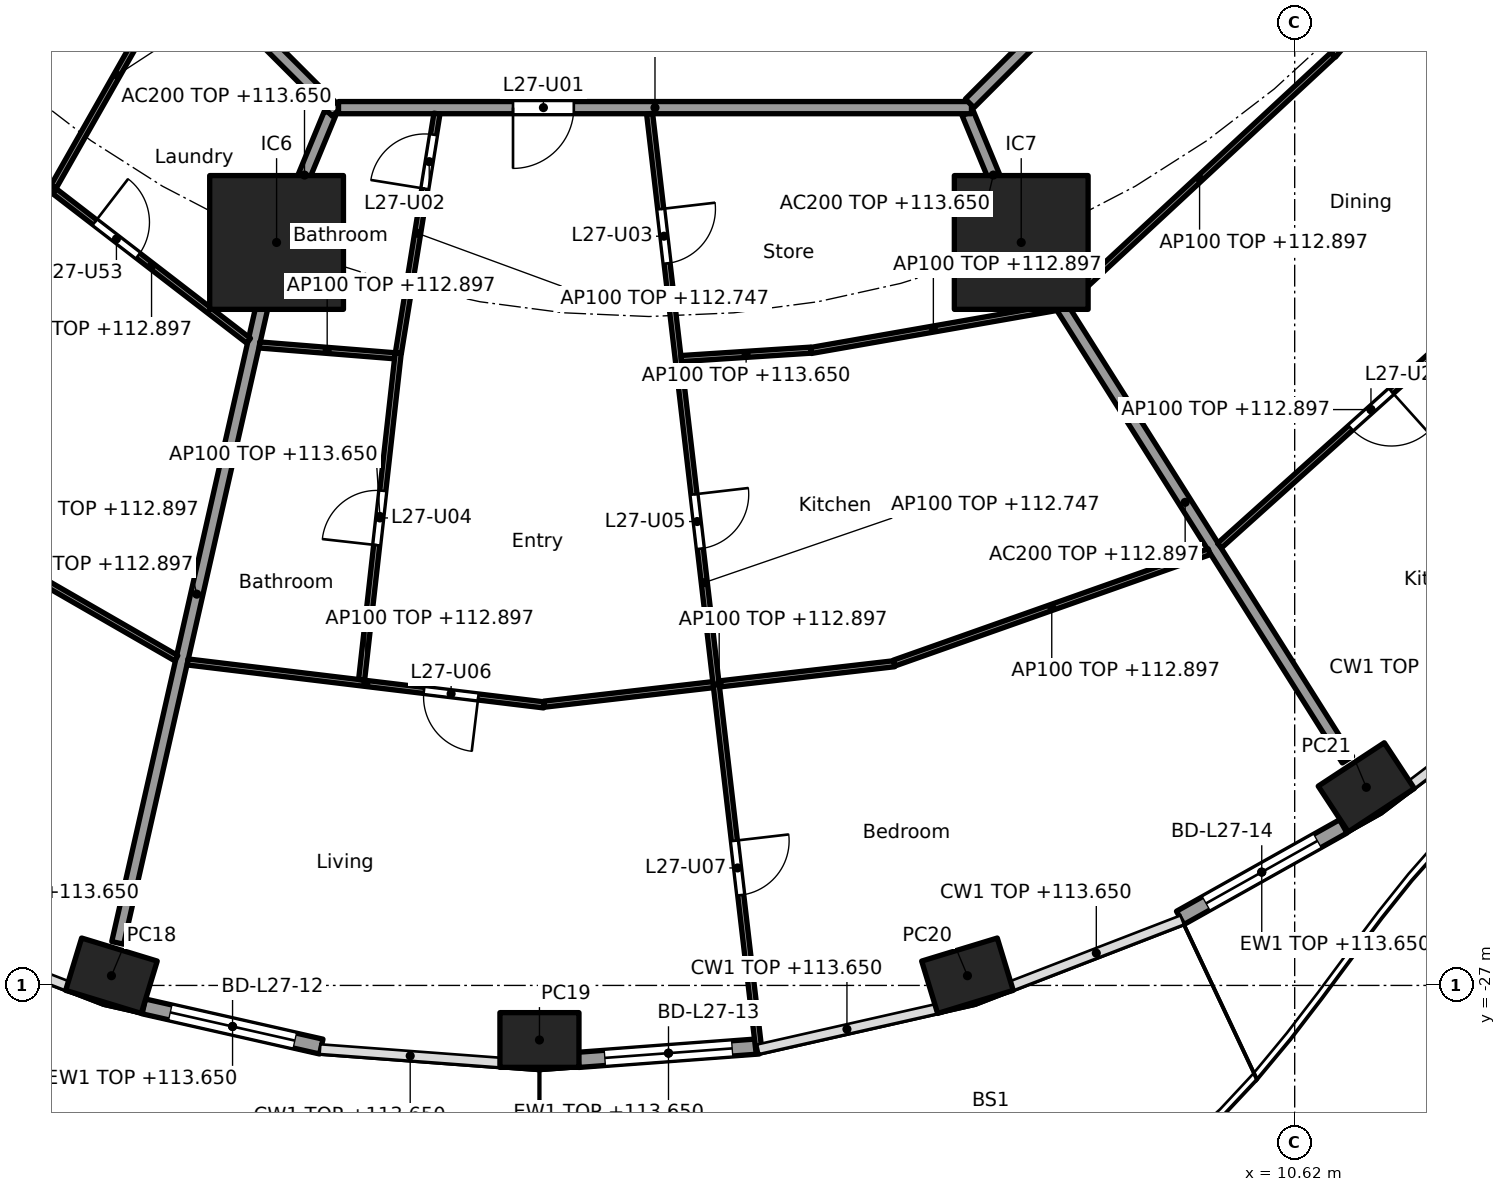
"""IFC4 building model, lengths in metres.
Left out: names, types, materials, properties, quantities, classifications, styles, units other than length and angle.
Written with IfcOpenShell. Run it as: python <this file> out.ifc"""

import sys

from ifc_helpers import new_model, si_unit, direction, frame, frame_2d, origin, origin_2d, place, context, subcontext, project, spatial, rectangle, hollow_rectangle, extrude, element, fill, save


model = new_model("IFC4")
c1 = context("Model", 3, precision=1e-05, world=origin(), true_north=direction((0.0, 1.0)))
c2 = subcontext(c1, "Body", "Model", "MODEL_VIEW")
j1 = project(units=[si_unit("LENGTHUNIT", "METRE"), si_unit("PLANEANGLEUNIT", "RADIAN")], contexts=[c1])
p1 = place(None, origin())
s1 = spatial("IfcSite", under=j1, at=p1, CompositionType="ELEMENT")
p2 = place(p1, origin())
s2 = spatial("IfcBuilding", under=s1, at=p2, CompositionType="ELEMENT")
p3 = place(p2, frame((0.0, 0.0, 110.3)))
s3 = spatial("IfcBuildingStorey", under=s2, at=p3, CompositionType="ELEMENT", Elevation=110.3)
for number, where, z_axis, x_axis in (
    (1, (-8.839, -26.841, 0.0), (0.0, 0.0, 1.0), (0.957, -0.292, 0.0)),
    (2, (-1.8, -27.897, 0.0), (0.0, 0.0, 1.0), (1.0, 0.0, 0.0)),
    (3, (5.239, -26.841, 0.0), (0.0, 0.0, 1.0), (0.957, 0.292, 0.0)),
    (4, (11.798, -23.742, 0.0), (0.0, 0.0, 1.0), (0.836, 0.549, 0.0)),
):
    element("IfcColumn", number, at=place(p3, frame(where, z_axis=z_axis, x_axis=x_axis)), inside=s3, PredefinedType="COLUMN", context=c2, shape_type="SweptSolid", body=[
        extrude(hollow_rectangle(XDim=1.3, YDim=0.9, WallThickness=0.045, at=origin_2d()), origin(), (0.0, 0.0, 1.0), 3.7),
    ])
for number, where, z_axis, x_axis in (
    (5, (-6.123, -14.782, 0.0), (0.0, 0.0, 1.0), (1.0, 0.0, 0.0)),
    (6, (6.123, -14.782, 0.0), (0.0, 0.0, 1.0), (1.0, 0.0, 0.0)),
):
    element("IfcColumn", number, at=place(p3, frame(where, z_axis=z_axis, x_axis=x_axis)), inside=s3, PredefinedType="COLUMN", context=c2, shape_type="SweptSolid", body=[
        extrude(rectangle(XDim=2.2, YDim=2.2, at=origin_2d()), origin(), (0.0, 0.0, 1.0), 3.7),
    ])
p4 = place(p3, frame((-5.387, -28.006, 0.0), z_axis=(0.0, 0.0, 1.0), x_axis=(-0.975317607872, 0.220806620767, 0.0)))
e7 = element("IfcWall", 7, at=p4, inside=s3, PredefinedType="SOLIDWALL", context=c2, shape_type="SweptSolid", body=[
    extrude(rectangle(XDim=2.993, YDim=0.25, at=frame_2d((1.497, 0.0))), origin(), (0.0, 0.0, 1.0), 3.35),
])
p5 = place(p4, frame((0.447, 0.0, 0.0)))
e8 = element("IfcOpeningElement", 8, at=p5, cuts=e7, PredefinedType="OPENING", context=c2, shape_type="SweptSolid", body=[
    extrude(rectangle(XDim=2.1, YDim=2.4, at=frame_2d((1.05, 1.2))), frame((0.0, 0.135, 0.0), z_axis=(0.0, -1.0, 0.0), x_axis=(1.0, 0.0, 0.0)), (0.0, 0.0, 1.0), 0.27),
])
p6 = place(p3, frame((1.806, -28.003, 0.0), z_axis=(0.0, 0.0, 1.0), x_axis=(-0.997226174467, -0.074430887117, 0.0)))
e9 = element("IfcWall", 9, at=p6, inside=s3, PredefinedType="SOLIDWALL", context=c2, shape_type="SweptSolid", body=[
    extrude(rectangle(XDim=2.975, YDim=0.25, at=frame_2d((1.488, 0.0))), origin(), (0.0, 0.0, 1.0), 3.35),
])
p7 = place(p6, frame((0.438, 0.0, 0.0)))
e10 = element("IfcOpeningElement", 10, at=p7, cuts=e9, PredefinedType="OPENING", context=c2, shape_type="SweptSolid", body=[
    extrude(rectangle(XDim=2.1, YDim=2.4, at=frame_2d((1.05, 1.2))), frame((0.0, 0.135, 0.0), z_axis=(0.0, -1.0, 0.0), x_axis=(1.0, 0.0, 0.0)), (0.0, 0.0, 1.0), 0.27),
])
p8 = place(p3, frame((11.419, -24.384, 0.0), z_axis=(0.0, 0.0, 1.0), x_axis=(-0.872071158476, -0.489379090843, 0.0)))
e11 = element("IfcWall", 11, at=p8, inside=s3, PredefinedType="SOLIDWALL", context=c2, shape_type="SweptSolid", body=[
    extrude(rectangle(XDim=3.076, YDim=0.25, at=frame_2d((1.538, 0.0))), origin(), (0.0, 0.0, 1.0), 3.35),
])
p9 = place(p8, frame((0.488, 0.0, 0.0)))
e12 = element("IfcOpeningElement", 12, at=p9, cuts=e11, PredefinedType="OPENING", context=c2, shape_type="SweptSolid", body=[
    extrude(rectangle(XDim=2.1, YDim=2.4, at=frame_2d((1.05, 1.2))), frame((0.0, 0.135, 0.0), z_axis=(0.0, -1.0, 0.0), x_axis=(1.0, 0.0, 0.0)), (0.0, 0.0, 1.0), 0.27),
])
p10 = place(p3, frame((-5.243, -12.657, 0.0), z_axis=(0.0, 0.0, 1.0), x_axis=(-0.382668627144, -0.923885664896, 0.0)))
e13 = element("IfcWall", 13, at=p10, inside=s3, PredefinedType="PARTITIONING", context=c2, shape_type="SweptSolid", body=[
    extrude(rectangle(XDim=2.2, YDim=0.2, at=frame_2d((1.1, 0.0))), origin(), (0.0, 0.0, 1.0), 3.35),
])
p11 = place(p3, frame((-6.134, -14.831, 0.0), z_axis=(0.0, 0.0, 1.0), x_axis=(-0.221225405869, -0.975222702667, 0.0)))
e14 = element("IfcWall", 14, at=p11, inside=s3, PredefinedType="PARTITIONING", context=c2, shape_type="SweptSolid", body=[
    extrude(rectangle(XDim=11.761, YDim=0.2, at=frame_2d((5.88, 0.0))), origin(), (0.0, 0.0, 1.0), 2.597),
])
p12 = place(p3, frame((5.243, -12.657, 0.0), z_axis=(0.0, 0.0, 1.0), x_axis=(0.382747093259, -0.923853160736, 0.0)))
e15 = element("IfcWall", 15, at=p12, inside=s3, PredefinedType="PARTITIONING", context=c2, shape_type="SweptSolid", body=[
    extrude(rectangle(XDim=2.2, YDim=0.2, at=frame_2d((1.1, 0.0))), origin(), (0.0, 0.0, 1.0), 3.35),
])
p13 = place(p3, frame((6.15, -14.824, 0.0), z_axis=(0.0, 0.0, 1.0), x_axis=(0.533492589682, -0.845804739142, 0.0)))
e16 = element("IfcWall", 16, at=p13, inside=s3, PredefinedType="PARTITIONING", context=c2, shape_type="SweptSolid", body=[
    extrude(rectangle(XDim=10.006, YDim=0.2, at=frame_2d((5.003, 0.0))), origin(), (0.0, 0.0, 1.0), 2.597),
])
p14 = place(p3, frame((-12.635, -5.134, 0.0), z_axis=(0.0, 0.0, 1.0), x_axis=(0.707106781187, -0.707106781187, 0.0)))
e17 = element("IfcWall", 17, at=p14, inside=s3, PredefinedType="PARTITIONING", context=c2, shape_type="SweptSolid", body=[
    extrude(rectangle(XDim=10.609, YDim=0.2, at=frame_2d((5.305, 0.0))), origin(), (0.0, 0.0, 1.0), 3.35),
])
p15 = place(p3, frame((-5.104, -12.565, 0.0), z_axis=(0.0, 0.0, 1.0), x_axis=(1.0, 0.0, 0.0)))
e18 = element("IfcWall", 18, at=p15, inside=s3, PredefinedType="PARTITIONING", context=c2, shape_type="SweptSolid", body=[
    extrude(rectangle(XDim=10.409, YDim=0.2, at=frame_2d((5.205, 0.0))), origin(), (0.0, 0.0, 1.0), 3.35),
])
p16 = place(p15, frame((2.87, 0.0, 0.0)))
e19 = element("IfcOpeningElement", 19, at=p16, cuts=e18, PredefinedType="OPENING", context=c2, shape_type="SweptSolid", body=[
    extrude(rectangle(XDim=1.0, YDim=2.1, at=frame_2d((0.5, 1.05))), frame((0.0, 0.11, 0.0), z_axis=(0.0, -1.0, 0.0), x_axis=(1.0, 0.0, 0.0)), (0.0, 0.0, 1.0), 0.22),
])
p17 = place(p3, frame((5.275, -12.494, 0.0), z_axis=(0.0, 0.0, 1.0), x_axis=(0.707106781187, 0.707106781187, 0.0)))
e20 = element("IfcWall", 20, at=p17, inside=s3, PredefinedType="PARTITIONING", context=c2, shape_type="SweptSolid", body=[
    extrude(rectangle(XDim=10.409, YDim=0.2, at=frame_2d((5.205, 0.0))), origin(), (0.0, 0.0, 1.0), 3.35),
])
p18 = place(p3, frame((-13.118, -10.8, 0.0), z_axis=(0.0, 0.0, 1.0), x_axis=(0.72818280142, -0.685382964273, 0.0)))
e21 = element("IfcWall", 21, at=p18, inside=s3, PredefinedType="PARTITIONING", context=c2, shape_type="SweptSolid", body=[
    extrude(rectangle(XDim=4.586, YDim=0.1, at=frame_2d((2.293, 0.0))), origin(), (0.0, 0.0, 1.0), 2.597),
])
p19 = place(p3, frame((-7.707, -10.198, 0.0), z_axis=(0.0, 0.0, 1.0), x_axis=(-0.493986531217, -0.869469554945, 0.0)))
e22 = element("IfcWall", 22, at=p19, inside=s3, PredefinedType="PARTITIONING", context=c2, shape_type="SweptSolid", body=[
    extrude(rectangle(XDim=4.217, YDim=0.1, at=frame_2d((2.109, 0.0))), origin(), (0.0, 0.0, 1.0), 2.447),
])
p20 = place(p3, frame((-9.775, -13.939, 0.0), z_axis=(0.0, 0.0, 1.0), x_axis=(0.792162117554, -0.610310723741, 0.0)))
e23 = element("IfcWall", 23, at=p20, inside=s3, PredefinedType="PARTITIONING", context=c2, shape_type="SweptSolid", body=[
    extrude(rectangle(XDim=4.03, YDim=0.1, at=frame_2d((2.015, 0.0))), origin(), (0.0, 0.0, 1.0), 2.597),
])
p21 = place(p20, frame((0.836, 0.0, 0.0)))
e24 = element("IfcOpeningElement", 24, at=p21, cuts=e23, PredefinedType="OPENING", context=c2, shape_type="SweptSolid", body=[
    extrude(rectangle(XDim=0.9, YDim=2.1, at=frame_2d((0.45, 1.05))), frame((0.0, 0.06, 0.0), z_axis=(0.0, -1.0, 0.0), x_axis=(1.0, 0.0, 0.0)), (0.0, 0.0, 1.0), 0.12),
])
p22 = place(p3, frame((-12.568, -18.856, 0.0), z_axis=(0.0, 0.0, 1.0), x_axis=(0.866533437451, -0.499119025664, 0.0)))
e25 = element("IfcWall", 25, at=p22, inside=s3, PredefinedType="PARTITIONING", context=c2, shape_type="SweptSolid", body=[
    extrude(rectangle(XDim=5.535, YDim=0.1, at=frame_2d((2.768, 0.0))), origin(), (0.0, 0.0, 1.0), 2.597),
])
p23 = place(p3, frame((-6.404, -16.468, 0.0), z_axis=(0.0, 0.0, 1.0), x_axis=(0.996819101134, -0.079697425392, 0.0)))
e26 = element("IfcWall", 26, at=p23, inside=s3, PredefinedType="PARTITIONING", context=c2, shape_type="SweptSolid", body=[
    extrude(rectangle(XDim=2.233, YDim=0.1, at=frame_2d((1.117, 0.0))), origin(), (0.0, 0.0, 1.0), 2.597),
])
p24 = place(p3, frame((-7.586, -21.68, 0.0), z_axis=(0.0, 0.0, 1.0), x_axis=(0.992810535213, -0.119696454295, 0.0)))
e27 = element("IfcWall", 27, at=p24, inside=s3, PredefinedType="PARTITIONING", context=c2, shape_type="SweptSolid", body=[
    extrude(rectangle(XDim=5.903, YDim=0.1, at=frame_2d((2.951, 0.0))), origin(), (0.0, 0.0, 1.0), 2.597),
])
p25 = place(p24, frame((3.915, 0.0, 0.0)))
e28 = element("IfcOpeningElement", 28, at=p25, cuts=e27, PredefinedType="OPENING", context=c2, shape_type="SweptSolid", body=[
    extrude(rectangle(XDim=0.9, YDim=2.1, at=frame_2d((0.45, 1.05))), frame((0.0, 0.06, 0.0), z_axis=(0.0, -1.0, 0.0), x_axis=(1.0, 0.0, 0.0)), (0.0, 0.0, 1.0), 0.12),
])
p26 = place(p3, frame((-3.486, -12.664, 0.0), z_axis=(0.0, 0.0, 1.0), x_axis=(-0.159124641548, -0.987258501332, 0.0)))
e29 = element("IfcWall", 29, at=p26, inside=s3, PredefinedType="PARTITIONING", context=c2, shape_type="SweptSolid", body=[
    extrude(rectangle(XDim=3.988, YDim=0.1, at=frame_2d((1.994, 0.0))), origin(), (0.0, 0.0, 1.0), 2.447),
])
p27 = place(p26, frame((0.35, 0.0, 0.0)))
e30 = element("IfcOpeningElement", 30, at=p27, cuts=e29, PredefinedType="OPENING", context=c2, shape_type="SweptSolid", body=[
    extrude(rectangle(XDim=0.9, YDim=2.1, at=frame_2d((0.45, 1.05))), frame((0.0, 0.06, 0.0), z_axis=(0.0, -1.0, 0.0), x_axis=(1.0, 0.0, 0.0)), (0.0, 0.0, 1.0), 0.12),
])
p28 = place(p3, frame((-4.122, -16.6, 0.0), z_axis=(0.0, 0.0, 1.0), x_axis=(-0.111357928679, -0.993780363924, 0.0)))
e31 = element("IfcWall", 31, at=p28, inside=s3, PredefinedType="PARTITIONING", context=c2, shape_type="SweptSolid", body=[
    extrude(rectangle(XDim=5.409, YDim=0.1, at=frame_2d((2.704, 0.0))), origin(), (0.0, 0.0, 1.0), 3.35),
])
p29 = place(p28, frame((2.279, 0.0, 0.0)))
e32 = element("IfcOpeningElement", 32, at=p29, cuts=e31, PredefinedType="OPENING", context=c2, shape_type="SweptSolid", body=[
    extrude(rectangle(XDim=0.9, YDim=2.1, at=frame_2d((0.45, 1.05))), frame((0.0, 0.06, 0.0), z_axis=(0.0, -1.0, 0.0), x_axis=(1.0, 0.0, 0.0)), (0.0, 0.0, 1.0), 0.12),
])
p30 = place(p3, frame((-1.726, -22.375, 0.0), z_axis=(0.0, 0.0, 1.0), x_axis=(0.993392336919, 0.114767874207, 0.0)))
e33 = element("IfcWall", 33, at=p30, inside=s3, PredefinedType="PARTITIONING", context=c2, shape_type="SweptSolid", body=[
    extrude(rectangle(XDim=5.801, YDim=0.1, at=frame_2d((2.9, 0.0))), origin(), (0.0, 0.0, 1.0), 2.597),
])
p31 = place(p3, frame((0.011, -12.664, 0.0), z_axis=(0.0, 0.0, 1.0), x_axis=(0.115841404661, -0.993267722704, 0.0)))
e34 = element("IfcWall", 34, at=p31, inside=s3, PredefinedType="PARTITIONING", context=c2, shape_type="SweptSolid", body=[
    extrude(rectangle(XDim=15.528, YDim=0.1, at=frame_2d((7.764, 0.0))), origin(), (0.0, 0.0, 1.0), 2.447),
])
p32 = place(p31, frame((1.579, 0.0, 0.0)))
e35 = element("IfcOpeningElement", 35, at=p32, cuts=e34, PredefinedType="OPENING", context=c2, shape_type="SweptSolid", body=[
    extrude(rectangle(XDim=0.9, YDim=2.1, at=frame_2d((0.45, 1.05))), frame((0.0, 0.06, 0.0), z_axis=(0.0, -1.0, 0.0), x_axis=(1.0, 0.0, 0.0)), (0.0, 0.0, 1.0), 0.12),
])
p33 = place(p31, frame((6.303, 0.0, 0.0)))
e36 = element("IfcOpeningElement", 36, at=p33, cuts=e34, PredefinedType="OPENING", context=c2, shape_type="SweptSolid", body=[
    extrude(rectangle(XDim=0.9, YDim=2.1, at=frame_2d((0.45, 1.05))), frame((0.0, 0.06, 0.0), z_axis=(0.0, -1.0, 0.0), x_axis=(1.0, 0.0, 0.0)), (0.0, 0.0, 1.0), 0.12),
])
p34 = place(p31, frame((12.038, 0.0, 0.0)))
e37 = element("IfcOpeningElement", 37, at=p34, cuts=e34, PredefinedType="OPENING", context=c2, shape_type="SweptSolid", body=[
    extrude(rectangle(XDim=0.9, YDim=2.1, at=frame_2d((0.45, 1.05))), frame((0.0, 0.06, 0.0), z_axis=(0.0, -1.0, 0.0), x_axis=(1.0, 0.0, 0.0)), (0.0, 0.0, 1.0), 0.12),
])
p35 = place(p3, frame((0.531, -16.691, 0.0), z_axis=(0.0, 0.0, 1.0), x_axis=(0.997895869517, 0.064836977109, 0.0)))
e38 = element("IfcWall", 38, at=p35, inside=s3, PredefinedType="PARTITIONING", context=c2, shape_type="SweptSolid", body=[
    extrude(rectangle(XDim=2.139, YDim=0.1, at=frame_2d((1.069, 0.0))), origin(), (0.0, 0.0, 1.0), 3.35),
])
p36 = place(p3, frame((2.667, -16.558, 0.0), z_axis=(0.0, 0.0, 1.0), x_axis=(0.984996445375, 0.172574629069, 0.0)))
e39 = element("IfcWall", 39, at=p36, inside=s3, PredefinedType="PARTITIONING", context=c2, shape_type="SweptSolid", body=[
    extrude(rectangle(XDim=4.084, YDim=0.1, at=frame_2d((2.042, 0.0))), origin(), (0.0, 0.0, 1.0), 2.597),
])
p37 = place(p3, frame((4.034, -21.698, 0.0), z_axis=(0.0, 0.0, 1.0), x_axis=(0.942861482644, 0.33318497047, 0.0)))
e40 = element("IfcWall", 40, at=p37, inside=s3, PredefinedType="PARTITIONING", context=c2, shape_type="SweptSolid", body=[
    extrude(rectangle(XDim=5.495, YDim=0.1, at=frame_2d((2.748, 0.0))), origin(), (0.0, 0.0, 1.0), 2.597),
])
p38 = place(p3, frame((6.861, -15.768, 0.0), z_axis=(0.0, 0.0, 1.0), x_axis=(0.733011256509, 0.680216508056, 0.0)))
e41 = element("IfcWall", 41, at=p38, inside=s3, PredefinedType="PARTITIONING", context=c2, shape_type="SweptSolid", body=[
    extrude(rectangle(XDim=5.989, YDim=0.1, at=frame_2d((2.994, 0.0))), origin(), (0.0, 0.0, 1.0), 2.597),
])
p39 = place(p3, frame((9.384, -19.768, 0.0), z_axis=(0.0, 0.0, 1.0), x_axis=(0.74387407395, 0.668319805262, 0.0)))
e42 = element("IfcWall", 42, at=p39, inside=s3, PredefinedType="PARTITIONING", context=c2, shape_type="SweptSolid", body=[
    extrude(rectangle(XDim=6.695, YDim=0.1, at=frame_2d((3.348, 0.0))), origin(), (0.0, 0.0, 1.0), 2.597),
])
p40 = place(p39, frame((2.898, 0.0, 0.0)))
e43 = element("IfcOpeningElement", 43, at=p40, cuts=e42, PredefinedType="OPENING", context=c2, shape_type="SweptSolid", body=[
    extrude(rectangle(XDim=0.9, YDim=2.1, at=frame_2d((0.45, 1.05))), frame((0.0, 0.06, 0.0), z_axis=(0.0, -1.0, 0.0), x_axis=(1.0, 0.0, 0.0)), (0.0, 0.0, 1.0), 0.12),
])
p41 = place(p3, frame((11.255, -11.699, 0.0), z_axis=(0.0, 0.0, 1.0), x_axis=(0.64610637779, 0.763247370503, 0.0)))
e44 = element("IfcWall", 44, at=p41, inside=s3, PredefinedType="PARTITIONING", context=c2, shape_type="SweptSolid", body=[
    extrude(rectangle(XDim=6.467, YDim=0.1, at=frame_2d((3.233, 0.0))), origin(), (0.0, 0.0, 1.0), 2.597),
])
p42 = place(p41, frame((2.809, 0.0, 0.0)))
e45 = element("IfcOpeningElement", 45, at=p42, cuts=e44, PredefinedType="OPENING", context=c2, shape_type="SweptSolid", body=[
    extrude(rectangle(XDim=0.9, YDim=2.1, at=frame_2d((0.45, 1.05))), frame((0.0, 0.06, 0.0), z_axis=(0.0, -1.0, 0.0), x_axis=(1.0, 0.0, 0.0)), (0.0, 0.0, 1.0), 0.12),
])
p43 = place(p5, origin())
e46 = element("IfcDoor", 46, at=p43, inside=s3, OperationType="SLIDING_TO_LEFT", PredefinedType="DOOR", context=c2, shape_type="SweptSolid", body=[
    extrude(rectangle(XDim=2.1, YDim=2.4, at=frame_2d((1.05, 1.2))), frame((0.0, 0.025, 0.0), z_axis=(0.0, -1.0, 0.0), x_axis=(1.0, 0.0, 0.0)), (0.0, 0.0, 1.0), 0.05),
])
fill(e8, e46)
p44 = place(p7, origin())
e47 = element("IfcDoor", 47, at=p44, inside=s3, OperationType="SLIDING_TO_LEFT", PredefinedType="DOOR", context=c2, shape_type="SweptSolid", body=[
    extrude(rectangle(XDim=2.1, YDim=2.4, at=frame_2d((1.05, 1.2))), frame((0.0, 0.025, 0.0), z_axis=(0.0, -1.0, 0.0), x_axis=(1.0, 0.0, 0.0)), (0.0, 0.0, 1.0), 0.05),
])
fill(e10, e47)
p45 = place(p9, origin())
e48 = element("IfcDoor", 48, at=p45, inside=s3, OperationType="SLIDING_TO_LEFT", PredefinedType="DOOR", context=c2, shape_type="SweptSolid", body=[
    extrude(rectangle(XDim=2.1, YDim=2.4, at=frame_2d((1.05, 1.2))), frame((0.0, 0.025, 0.0), z_axis=(0.0, -1.0, 0.0), x_axis=(1.0, 0.0, 0.0)), (0.0, 0.0, 1.0), 0.05),
])
fill(e12, e48)
p46 = place(p16, frame((1.0, 0.0, 0.0), x_axis=(-1.0, 0.0, 0.0)))
e49 = element("IfcDoor", 49, at=p46, inside=s3, OperationType="SINGLE_SWING_RIGHT", PredefinedType="DOOR", context=c2, shape_type="SweptSolid", body=[
    extrude(rectangle(XDim=1.0, YDim=2.1, at=frame_2d((0.5, 1.05))), frame((0.0, 0.025, 0.0), z_axis=(0.0, -1.0, 0.0), x_axis=(1.0, 0.0, 0.0)), (0.0, 0.0, 1.0), 0.05),
])
fill(e19, e49)
p47 = place(p27, frame((0.9, 0.0, 0.0), x_axis=(-1.0, 0.0, 0.0)))
e50 = element("IfcDoor", 50, at=p47, inside=s3, OperationType="SINGLE_SWING_LEFT", PredefinedType="DOOR", context=c2, shape_type="SweptSolid", body=[
    extrude(rectangle(XDim=0.9, YDim=2.1, at=frame_2d((0.45, 1.05))), frame((0.0, 0.025, 0.0), z_axis=(0.0, -1.0, 0.0), x_axis=(1.0, 0.0, 0.0)), (0.0, 0.0, 1.0), 0.05),
])
fill(e30, e50)
p48 = place(p32, origin())
e51 = element("IfcDoor", 51, at=p48, inside=s3, OperationType="SINGLE_SWING_LEFT", PredefinedType="DOOR", context=c2, shape_type="SweptSolid", body=[
    extrude(rectangle(XDim=0.9, YDim=2.1, at=frame_2d((0.45, 1.05))), frame((0.0, 0.025, 0.0), z_axis=(0.0, -1.0, 0.0), x_axis=(1.0, 0.0, 0.0)), (0.0, 0.0, 1.0), 0.05),
])
fill(e35, e51)
p49 = place(p29, frame((0.9, 0.0, 0.0), x_axis=(-1.0, 0.0, 0.0)))
e52 = element("IfcDoor", 52, at=p49, inside=s3, OperationType="SINGLE_SWING_LEFT", PredefinedType="DOOR", context=c2, shape_type="SweptSolid", body=[
    extrude(rectangle(XDim=0.9, YDim=2.1, at=frame_2d((0.45, 1.05))), frame((0.0, 0.025, 0.0), z_axis=(0.0, -1.0, 0.0), x_axis=(1.0, 0.0, 0.0)), (0.0, 0.0, 1.0), 0.05),
])
fill(e32, e52)
p50 = place(p33, origin())
e53 = element("IfcDoor", 53, at=p50, inside=s3, OperationType="SINGLE_SWING_LEFT", PredefinedType="DOOR", context=c2, shape_type="SweptSolid", body=[
    extrude(rectangle(XDim=0.9, YDim=2.1, at=frame_2d((0.45, 1.05))), frame((0.0, 0.025, 0.0), z_axis=(0.0, -1.0, 0.0), x_axis=(1.0, 0.0, 0.0)), (0.0, 0.0, 1.0), 0.05),
])
fill(e36, e53)
p51 = place(p25, frame((0.9, 0.0, 0.0), x_axis=(-1.0, 0.0, 0.0)))
e54 = element("IfcDoor", 54, at=p51, inside=s3, OperationType="SINGLE_SWING_LEFT", PredefinedType="DOOR", context=c2, shape_type="SweptSolid", body=[
    extrude(rectangle(XDim=0.9, YDim=2.1, at=frame_2d((0.45, 1.05))), frame((0.0, 0.025, 0.0), z_axis=(0.0, -1.0, 0.0), x_axis=(1.0, 0.0, 0.0)), (0.0, 0.0, 1.0), 0.05),
])
fill(e28, e54)
p52 = place(p34, origin())
e55 = element("IfcDoor", 55, at=p52, inside=s3, OperationType="SINGLE_SWING_LEFT", PredefinedType="DOOR", context=c2, shape_type="SweptSolid", body=[
    extrude(rectangle(XDim=0.9, YDim=2.1, at=frame_2d((0.45, 1.05))), frame((0.0, 0.025, 0.0), z_axis=(0.0, -1.0, 0.0), x_axis=(1.0, 0.0, 0.0)), (0.0, 0.0, 1.0), 0.05),
])
fill(e37, e55)
p53 = place(p40, frame((0.9, 0.0, 0.0), x_axis=(-1.0, 0.0, 0.0)))
e56 = element("IfcDoor", 56, at=p53, inside=s3, OperationType="SINGLE_SWING_LEFT", PredefinedType="DOOR", context=c2, shape_type="SweptSolid", body=[
    extrude(rectangle(XDim=0.9, YDim=2.1, at=frame_2d((0.45, 1.05))), frame((0.0, 0.025, 0.0), z_axis=(0.0, -1.0, 0.0), x_axis=(1.0, 0.0, 0.0)), (0.0, 0.0, 1.0), 0.05),
])
fill(e43, e56)
p54 = place(p21, origin())
e57 = element("IfcDoor", 57, at=p54, inside=s3, OperationType="SINGLE_SWING_LEFT", PredefinedType="DOOR", context=c2, shape_type="SweptSolid", body=[
    extrude(rectangle(XDim=0.9, YDim=2.1, at=frame_2d((0.45, 1.05))), frame((0.0, 0.025, 0.0), z_axis=(0.0, -1.0, 0.0), x_axis=(1.0, 0.0, 0.0)), (0.0, 0.0, 1.0), 0.05),
])
fill(e24, e57)
save(model, sys.argv[1])
